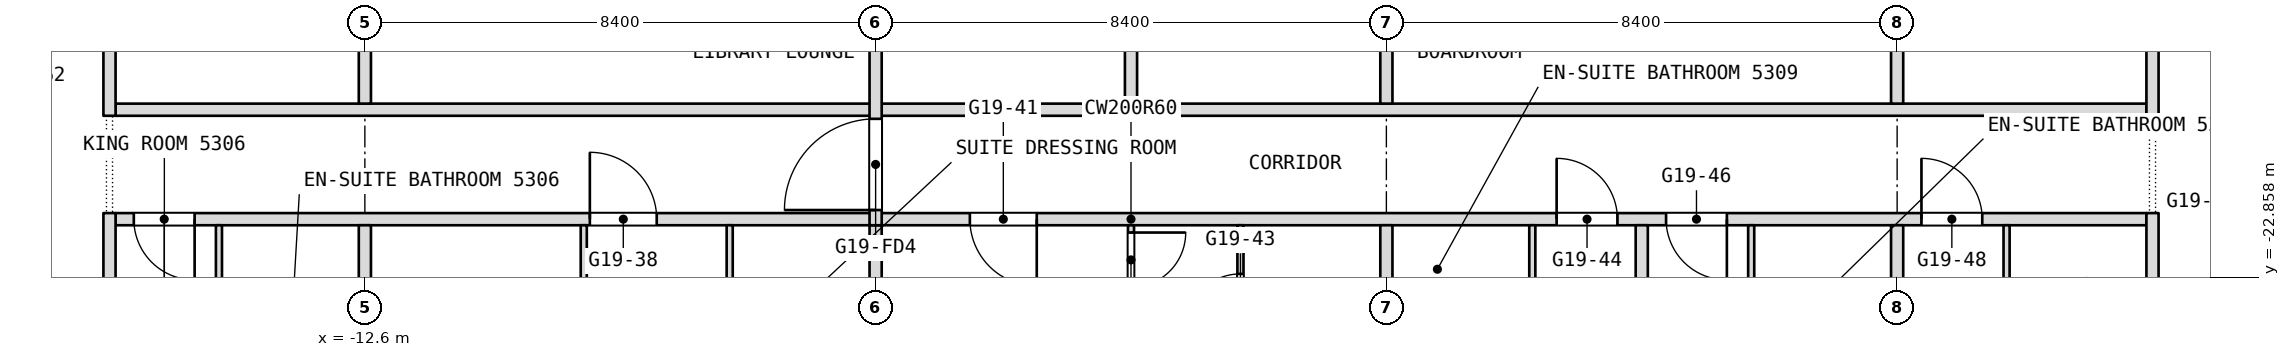
"""IFC4 building model, lengths in metres.
Left out: names, types, materials, properties, quantities, classifications, styles, units other than length and angle.
Written with IfcOpenShell. Run it as: python <this file> out.ifc"""

import sys

from ifc_helpers import new_model, si_unit, direction, frame, frame_2d, origin, place, context, subcontext, project, spatial, rectangle, extrude, element, fill, save


model = new_model("IFC4")
c1 = context("Model", 3, precision=1e-05, world=origin(), true_north=direction((0.0, 1.0)))
c2 = subcontext(c1, "Body", "Model", "MODEL_VIEW")
j1 = project(units=[si_unit("LENGTHUNIT", "METRE"), si_unit("PLANEANGLEUNIT", "RADIAN")], contexts=[c1])
p1 = place(None, origin())
s1 = spatial("IfcSite", under=j1, at=p1, CompositionType="ELEMENT")
p2 = place(p1, origin())
s2 = spatial("IfcBuilding", under=s1, at=p2, CompositionType="ELEMENT")
p3 = place(p2, frame((0.0, 0.0, 227.3)))
s3 = spatial("IfcBuildingStorey", under=s2, at=p3, CompositionType="ELEMENT", Elevation=227.3)
p4 = place(p3, frame((-16.7, -21.9, 0.0), z_axis=(0.0, 0.0, 1.0), x_axis=(1.0, 0.0, 0.0)))
e1 = element("IfcWall", 1, at=p4, inside=s3, PredefinedType="PARTITIONING", context=c2, shape_type="SweptSolid", body=[
    extrude(rectangle(XDim=33.4, YDim=0.2, at=frame_2d((16.7, 0.0))), origin(), (0.0, 0.0, 1.0), 3.34),
])
p5 = place(p4, frame((0.3, 0.0, 0.0)))
e2 = element("IfcOpeningElement", 2, at=p5, cuts=e1, PredefinedType="OPENING", context=c2, shape_type="SweptSolid", body=[
    extrude(rectangle(XDim=1.0, YDim=2.1, at=frame_2d((0.5, 1.05))), frame((0.0, 0.1, 0.0), z_axis=(0.0, -1.0, 0.0), x_axis=(1.0, 0.0, 0.0)), (0.0, 0.0, 1.0), 0.2),
])
p6 = place(p4, frame((7.8, 0.0, 0.0)))
e3 = element("IfcOpeningElement", 3, at=p6, cuts=e1, PredefinedType="OPENING", context=c2, shape_type="SweptSolid", body=[
    extrude(rectangle(XDim=1.1, YDim=2.1, at=frame_2d((0.55, 1.05))), frame((0.0, 0.1, 0.0), z_axis=(0.0, -1.0, 0.0), x_axis=(1.0, 0.0, 0.0)), (0.0, 0.0, 1.0), 0.2),
])
p7 = place(p4, frame((14.05, 0.0, 0.0)))
e4 = element("IfcOpeningElement", 4, at=p7, cuts=e1, PredefinedType="OPENING", context=c2, shape_type="SweptSolid", body=[
    extrude(rectangle(XDim=1.1, YDim=2.1, at=frame_2d((0.55, 1.05))), frame((0.0, 0.1, 0.0), z_axis=(0.0, -1.0, 0.0), x_axis=(1.0, 0.0, 0.0)), (0.0, 0.0, 1.0), 0.2),
])
p8 = place(p4, frame((23.7, 0.0, 0.0)))
e5 = element("IfcOpeningElement", 5, at=p8, cuts=e1, PredefinedType="OPENING", context=c2, shape_type="SweptSolid", body=[
    extrude(rectangle(XDim=1.0, YDim=2.1, at=frame_2d((0.5, 1.05))), frame((0.0, 0.1, 0.0), z_axis=(0.0, -1.0, 0.0), x_axis=(1.0, 0.0, 0.0)), (0.0, 0.0, 1.0), 0.2),
])
p9 = place(p4, frame((25.5, 0.0, 0.0)))
e6 = element("IfcOpeningElement", 6, at=p9, cuts=e1, PredefinedType="OPENING", context=c2, shape_type="SweptSolid", body=[
    extrude(rectangle(XDim=1.0, YDim=2.1, at=frame_2d((0.5, 1.05))), frame((0.0, 0.1, 0.0), z_axis=(0.0, -1.0, 0.0), x_axis=(1.0, 0.0, 0.0)), (0.0, 0.0, 1.0), 0.2),
])
p10 = place(p4, frame((29.7, 0.0, 0.0)))
e7 = element("IfcOpeningElement", 7, at=p10, cuts=e1, PredefinedType="OPENING", context=c2, shape_type="SweptSolid", body=[
    extrude(rectangle(XDim=1.0, YDim=2.1, at=frame_2d((0.5, 1.05))), frame((0.0, 0.1, 0.0), z_axis=(0.0, -1.0, 0.0), x_axis=(1.0, 0.0, 0.0)), (0.0, 0.0, 1.0), 0.2),
])
p11 = place(p3, frame((-16.7, -20.1, 0.0), z_axis=(0.0, 0.0, 1.0), x_axis=(1.0, 0.0, 0.0)))
e8 = element("IfcWall", 8, at=p11, inside=s3, PredefinedType="PARTITIONING", context=c2, shape_type="SweptSolid", body=[
    extrude(rectangle(XDim=33.4, YDim=0.2, at=frame_2d((16.7, 0.0))), origin(), (0.0, 0.0, 1.0), 3.34),
])
p12 = place(p3, frame((16.8, -27.229, 0.0), z_axis=(0.0, 0.0, 1.0), x_axis=(0.0, 1.0, 0.0)))
e9 = element("IfcWall", 9, at=p12, inside=s3, PredefinedType="PARTITIONING", context=c2, shape_type="SweptSolid", body=[
    extrude(rectangle(XDim=5.429, YDim=0.2, at=frame_2d((2.714, 0.0))), origin(), (0.0, 0.0, 1.0), 3.34),
])
p13 = place(p3, frame((16.8, -20.2, 0.0), z_axis=(0.0, 0.0, 1.0), x_axis=(0.0, 1.0, 0.0)))
e10 = element("IfcWall", 10, at=p13, inside=s3, PredefinedType="PARTITIONING", context=c2, shape_type="SweptSolid", body=[
    extrude(rectangle(XDim=6.8, YDim=0.2, at=frame_2d((3.4, 0.0))), origin(), (0.0, 0.0, 1.0), 3.34),
])
p14 = place(p3, frame((14.4, -24.95, 0.0), z_axis=(0.0, 0.0, 1.0), x_axis=(0.0, 1.0, 0.0)))
e11 = element("IfcWall", 11, at=p14, inside=s3, PredefinedType="PARTITIONING", context=c2, shape_type="SweptSolid", body=[
    extrude(rectangle(XDim=2.95, YDim=0.1, at=frame_2d((1.475, 0.0))), origin(), (0.0, 0.0, 1.0), 3.34),
])
p15 = place(p3, frame((12.6, -28.343, 0.0), z_axis=(0.0, 0.0, 1.0), x_axis=(0.0, 1.0, 0.0)))
e12 = element("IfcWall", 12, at=p15, inside=s3, PredefinedType="PARTITIONING", context=c2, shape_type="SweptSolid", body=[
    extrude(rectangle(XDim=6.343, YDim=0.2, at=frame_2d((3.171, 0.0))), origin(), (0.0, 0.0, 1.0), 3.34),
])
p16 = place(p3, frame((12.6, -20.0, 0.0), z_axis=(0.0, 0.0, 1.0), x_axis=(0.0, 1.0, 0.0)))
e13 = element("IfcWall", 13, at=p16, inside=s3, PredefinedType="PARTITIONING", context=c2, shape_type="SweptSolid", body=[
    extrude(rectangle(XDim=1.5, YDim=0.2, at=frame_2d((0.75, 0.0))), origin(), (0.0, 0.0, 1.0), 3.34),
])
p17 = place(p3, frame((10.2, -25.35, 0.0), z_axis=(0.0, 0.0, 1.0), x_axis=(0.0, 1.0, 0.0)))
e14 = element("IfcWall", 14, at=p17, inside=s3, PredefinedType="PARTITIONING", context=c2, shape_type="SweptSolid", body=[
    extrude(rectangle(XDim=3.35, YDim=0.1, at=frame_2d((1.675, 0.0))), origin(), (0.0, 0.0, 1.0), 3.34),
])
p18 = place(p3, frame((8.4, -28.9, 0.0), z_axis=(0.0, 0.0, 1.0), x_axis=(0.0, 1.0, 0.0)))
e15 = element("IfcWall", 15, at=p18, inside=s3, PredefinedType="PARTITIONING", context=c2, shape_type="SweptSolid", body=[
    extrude(rectangle(XDim=6.9, YDim=0.2, at=frame_2d((3.45, 0.0))), origin(), (0.0, 0.0, 1.0), 3.34),
])
p19 = place(p3, frame((6.6, -25.25, 0.0), z_axis=(0.0, 0.0, 1.0), x_axis=(0.0, 1.0, 0.0)))
e16 = element("IfcWall", 16, at=p19, inside=s3, PredefinedType="PARTITIONING", context=c2, shape_type="SweptSolid", body=[
    extrude(rectangle(XDim=3.25, YDim=0.1, at=frame_2d((1.625, 0.0))), origin(), (0.0, 0.0, 1.0), 3.34),
])
p20 = place(p19, frame((1.03, 0.0, 0.0)))
e17 = element("IfcOpeningElement", 17, at=p20, cuts=e16, PredefinedType="OPENING", context=c2, shape_type="SweptSolid", body=[
    extrude(rectangle(XDim=0.9, YDim=2.1, at=frame_2d((0.45, 1.05))), frame((0.0, 0.05, 0.0), z_axis=(0.0, -1.0, 0.0), x_axis=(1.0, 0.0, 0.0)), (0.0, 0.0, 1.0), 0.1),
])
p21 = place(p3, frame((4.2, -28.9, 0.0), z_axis=(0.0, 0.0, 1.0), x_axis=(0.0, 1.0, 0.0)))
e18 = element("IfcWall", 18, at=p21, inside=s3, PredefinedType="PARTITIONING", context=c2, shape_type="SweptSolid", body=[
    extrude(rectangle(XDim=6.9, YDim=0.2, at=frame_2d((3.45, 0.0))), origin(), (0.0, 0.0, 1.0), 3.34),
])
p22 = place(p3, frame((4.2, -20.0, 0.0), z_axis=(0.0, 0.0, 1.0), x_axis=(0.0, 1.0, 0.0)))
e19 = element("IfcWall", 19, at=p22, inside=s3, PredefinedType="PARTITIONING", context=c2, shape_type="SweptSolid", body=[
    extrude(rectangle(XDim=6.4, YDim=0.2, at=frame_2d((3.2, 0.0))), origin(), (0.0, 0.0, 1.0), 3.34),
])
p23 = place(p3, frame((1.8, -24.65, 0.0), z_axis=(0.0, 0.0, 1.0), x_axis=(0.0, 1.0, 0.0)))
e20 = element("IfcWall", 20, at=p23, inside=s3, PredefinedType="PARTITIONING", context=c2, shape_type="SweptSolid", body=[
    extrude(rectangle(XDim=2.65, YDim=0.1, at=frame_2d((1.325, 0.0))), origin(), (0.0, 0.0, 1.0), 3.34),
])
p24 = place(p23, frame((0.95, 0.0, 0.0)))
e21 = element("IfcOpeningElement", 21, at=p24, cuts=e20, PredefinedType="OPENING", context=c2, shape_type="SweptSolid", body=[
    extrude(rectangle(XDim=0.9, YDim=2.1, at=frame_2d((0.45, 1.05))), frame((0.0, 0.05, 0.0), z_axis=(0.0, -1.0, 0.0), x_axis=(1.0, 0.0, 0.0)), (0.0, 0.0, 1.0), 0.1),
])
p25 = place(p3, frame((0.0, -28.9, 0.0), z_axis=(0.0, 0.0, 1.0), x_axis=(0.0, 1.0, 0.0)))
e22 = element("IfcWall", 22, at=p25, inside=s3, PredefinedType="PARTITIONING", context=c2, shape_type="SweptSolid", body=[
    extrude(rectangle(XDim=6.9, YDim=0.1, at=frame_2d((3.45, 0.0))), origin(), (0.0, 0.0, 1.0), 3.34),
])
p26 = place(p25, frame((5.88, 0.0, 0.0)))
e23 = element("IfcOpeningElement", 23, at=p26, cuts=e22, PredefinedType="OPENING", context=c2, shape_type="SweptSolid", body=[
    extrude(rectangle(XDim=0.9, YDim=2.1, at=frame_2d((0.45, 1.05))), frame((0.0, 0.05, 0.0), z_axis=(0.0, -1.0, 0.0), x_axis=(1.0, 0.0, 0.0)), (0.0, 0.0, 1.0), 0.1),
])
p27 = place(p3, frame((0.0, -20.0, 0.0), z_axis=(0.0, 0.0, 1.0), x_axis=(0.0, 1.0, 0.0)))
e24 = element("IfcWall", 24, at=p27, inside=s3, PredefinedType="PARTITIONING", context=c2, shape_type="SweptSolid", body=[
    extrude(rectangle(XDim=6.4, YDim=0.2, at=frame_2d((3.2, 0.0))), origin(), (0.0, 0.0, 1.0), 3.34),
])
p28 = place(p3, frame((-4.2, -28.9, 0.0), z_axis=(0.0, 0.0, 1.0), x_axis=(0.0, 1.0, 0.0)))
e25 = element("IfcWall", 25, at=p28, inside=s3, PredefinedType="PARTITIONING", context=c2, shape_type="SweptSolid", body=[
    extrude(rectangle(XDim=6.9, YDim=0.2, at=frame_2d((3.45, 0.0))), origin(), (0.0, 0.0, 1.0), 3.34),
])
p29 = place(p3, frame((-4.2, -22.0, 0.0), z_axis=(0.0, 0.0, 1.0), x_axis=(0.0, 1.0, 0.0)))
e26 = element("IfcWall", 26, at=p29, inside=s3, PredefinedType="PARTITIONING", context=c2, shape_type="SweptSolid", body=[
    extrude(rectangle(XDim=8.4, YDim=0.2, at=frame_2d((4.2, 0.0))), origin(), (0.0, 0.0, 1.0), 3.34),
])
p30 = place(p29, frame((0.25, 0.0, 0.0)))
e27 = element("IfcOpeningElement", 27, at=p30, cuts=e26, PredefinedType="OPENING", context=c2, shape_type="SweptSolid", body=[
    extrude(rectangle(XDim=1.5, YDim=2.1, at=frame_2d((0.75, 1.05))), frame((0.0, 0.1, 0.0), z_axis=(0.0, -1.0, 0.0), x_axis=(1.0, 0.0, 0.0)), (0.0, 0.0, 1.0), 0.2),
])
p31 = place(p3, frame((-6.6, -25.55, 0.0), z_axis=(0.0, 0.0, 1.0), x_axis=(0.0, 1.0, 0.0)))
e28 = element("IfcWall", 28, at=p31, inside=s3, PredefinedType="PARTITIONING", context=c2, shape_type="SweptSolid", body=[
    extrude(rectangle(XDim=3.55, YDim=0.1, at=frame_2d((1.775, 0.0))), origin(), (0.0, 0.0, 1.0), 3.34),
])
p32 = place(p3, frame((-9.0, -25.45, 0.0), z_axis=(0.0, 0.0, 1.0), x_axis=(0.0, 1.0, 0.0)))
e29 = element("IfcWall", 29, at=p32, inside=s3, PredefinedType="PARTITIONING", context=c2, shape_type="SweptSolid", body=[
    extrude(rectangle(XDim=3.45, YDim=0.1, at=frame_2d((1.725, 0.0))), origin(), (0.0, 0.0, 1.0), 3.34),
])
p33 = place(p32, frame((0.94, 0.0, 0.0)))
e30 = element("IfcOpeningElement", 30, at=p33, cuts=e29, PredefinedType="OPENING", context=c2, shape_type="SweptSolid", body=[
    extrude(rectangle(XDim=0.9, YDim=2.1, at=frame_2d((0.45, 1.05))), frame((0.0, 0.05, 0.0), z_axis=(0.0, -1.0, 0.0), x_axis=(1.0, 0.0, 0.0)), (0.0, 0.0, 1.0), 0.1),
])
p34 = place(p3, frame((-12.6, -28.343, 0.0), z_axis=(0.0, 0.0, 1.0), x_axis=(0.0, 1.0, 0.0)))
e31 = element("IfcWall", 31, at=p34, inside=s3, PredefinedType="PARTITIONING", context=c2, shape_type="SweptSolid", body=[
    extrude(rectangle(XDim=6.343, YDim=0.2, at=frame_2d((3.171, 0.0))), origin(), (0.0, 0.0, 1.0), 3.34),
])
p35 = place(p3, frame((-12.6, -20.0, 0.0), z_axis=(0.0, 0.0, 1.0), x_axis=(0.0, 1.0, 0.0)))
e32 = element("IfcWall", 32, at=p35, inside=s3, PredefinedType="PARTITIONING", context=c2, shape_type="SweptSolid", body=[
    extrude(rectangle(XDim=1.5, YDim=0.2, at=frame_2d((0.75, 0.0))), origin(), (0.0, 0.0, 1.0), 3.34),
])
p36 = place(p3, frame((-15.0, -25.85, 0.0), z_axis=(0.0, 0.0, 1.0), x_axis=(0.0, 1.0, 0.0)))
e33 = element("IfcWall", 33, at=p36, inside=s3, PredefinedType="PARTITIONING", context=c2, shape_type="SweptSolid", body=[
    extrude(rectangle(XDim=3.85, YDim=0.1, at=frame_2d((1.925, 0.0))), origin(), (0.0, 0.0, 1.0), 3.34),
])
p37 = place(p3, frame((-16.8, -27.229, 0.0), z_axis=(0.0, 0.0, 1.0), x_axis=(0.0, 1.0, 0.0)))
e34 = element("IfcWall", 34, at=p37, inside=s3, PredefinedType="PARTITIONING", context=c2, shape_type="SweptSolid", body=[
    extrude(rectangle(XDim=5.429, YDim=0.2, at=frame_2d((2.714, 0.0))), origin(), (0.0, 0.0, 1.0), 3.34),
])
p38 = place(p3, frame((-16.8, -20.2, 0.0), z_axis=(0.0, 0.0, 1.0), x_axis=(0.0, 1.0, 0.0)))
e35 = element("IfcWall", 35, at=p38, inside=s3, PredefinedType="PARTITIONING", context=c2, shape_type="SweptSolid", body=[
    extrude(rectangle(XDim=6.8, YDim=0.2, at=frame_2d((3.4, 0.0))), origin(), (0.0, 0.0, 1.0), 3.34),
])
p39 = place(p5, origin())
e36 = element("IfcDoor", 36, at=p39, inside=s3, OperationType="SINGLE_SWING_RIGHT", PredefinedType="DOOR", context=c2, shape_type="SweptSolid", body=[
    extrude(rectangle(XDim=1.0, YDim=2.1, at=frame_2d((0.5, 1.05))), frame((0.0, 0.025, 0.0), z_axis=(0.0, -1.0, 0.0), x_axis=(1.0, 0.0, 0.0)), (0.0, 0.0, 1.0), 0.05),
])
fill(e2, e36)
p40 = place(p6, origin())
e37 = element("IfcDoor", 37, at=p40, inside=s3, OperationType="SINGLE_SWING_RIGHT", PredefinedType="DOOR", context=c2, shape_type="SweptSolid", body=[
    extrude(rectangle(XDim=1.1, YDim=2.1, at=frame_2d((0.55, 1.05))), frame((0.0, 0.025, 0.0), z_axis=(0.0, -1.0, 0.0), x_axis=(1.0, 0.0, 0.0)), (0.0, 0.0, 1.0), 0.05),
])
fill(e3, e37)
p41 = place(p7, origin())
e38 = element("IfcDoor", 38, at=p41, inside=s3, OperationType="SINGLE_SWING_LEFT", PredefinedType="DOOR", context=c2, shape_type="SweptSolid", body=[
    extrude(rectangle(XDim=1.1, YDim=2.1, at=frame_2d((0.55, 1.05))), frame((0.0, 0.025, 0.0), z_axis=(0.0, -1.0, 0.0), x_axis=(1.0, 0.0, 0.0)), (0.0, 0.0, 1.0), 0.05),
])
fill(e4, e38)
p42 = place(p8, origin())
e39 = element("IfcDoor", 39, at=p42, inside=s3, OperationType="SINGLE_SWING_RIGHT", PredefinedType="DOOR", context=c2, shape_type="SweptSolid", body=[
    extrude(rectangle(XDim=1.0, YDim=2.1, at=frame_2d((0.5, 1.05))), frame((0.0, 0.025, 0.0), z_axis=(0.0, -1.0, 0.0), x_axis=(1.0, 0.0, 0.0)), (0.0, 0.0, 1.0), 0.05),
])
fill(e5, e39)
p43 = place(p9, origin())
e40 = element("IfcDoor", 40, at=p43, inside=s3, OperationType="SINGLE_SWING_RIGHT", PredefinedType="DOOR", context=c2, shape_type="SweptSolid", body=[
    extrude(rectangle(XDim=1.0, YDim=2.1, at=frame_2d((0.5, 1.05))), frame((0.0, 0.025, 0.0), z_axis=(0.0, -1.0, 0.0), x_axis=(1.0, 0.0, 0.0)), (0.0, 0.0, 1.0), 0.05),
])
fill(e6, e40)
p44 = place(p10, origin())
e41 = element("IfcDoor", 41, at=p44, inside=s3, OperationType="SINGLE_SWING_RIGHT", PredefinedType="DOOR", context=c2, shape_type="SweptSolid", body=[
    extrude(rectangle(XDim=1.0, YDim=2.1, at=frame_2d((0.5, 1.05))), frame((0.0, 0.025, 0.0), z_axis=(0.0, -1.0, 0.0), x_axis=(1.0, 0.0, 0.0)), (0.0, 0.0, 1.0), 0.05),
])
fill(e7, e41)
p45 = place(p24, origin())
e42 = element("IfcDoor", 42, at=p45, inside=s3, OperationType="SINGLE_SWING_LEFT", PredefinedType="DOOR", context=c2, shape_type="SweptSolid", body=[
    extrude(rectangle(XDim=0.9, YDim=2.1, at=frame_2d((0.45, 1.05))), frame((0.0, 0.025, 0.0), z_axis=(0.0, -1.0, 0.0), x_axis=(1.0, 0.0, 0.0)), (0.0, 0.0, 1.0), 0.05),
])
fill(e21, e42)
p46 = place(p26, origin())
e43 = element("IfcDoor", 43, at=p46, inside=s3, OperationType="SINGLE_SWING_LEFT", PredefinedType="DOOR", context=c2, shape_type="SweptSolid", body=[
    extrude(rectangle(XDim=0.9, YDim=2.1, at=frame_2d((0.45, 1.05))), frame((0.0, 0.025, 0.0), z_axis=(0.0, -1.0, 0.0), x_axis=(1.0, 0.0, 0.0)), (0.0, 0.0, 1.0), 0.05),
])
fill(e23, e43)
p47 = place(p30, origin())
e44 = element("IfcDoor", 44, at=p47, inside=s3, OperationType="DOUBLE_DOOR_DOUBLE_SWING", PredefinedType="DOOR", context=c2, shape_type="SweptSolid", body=[
    extrude(rectangle(XDim=1.5, YDim=2.1, at=frame_2d((0.75, 1.05))), frame((0.0, 0.025, 0.0), z_axis=(0.0, -1.0, 0.0), x_axis=(1.0, 0.0, 0.0)), (0.0, 0.0, 1.0), 0.05),
])
fill(e27, e44)
save(model, sys.argv[1])
